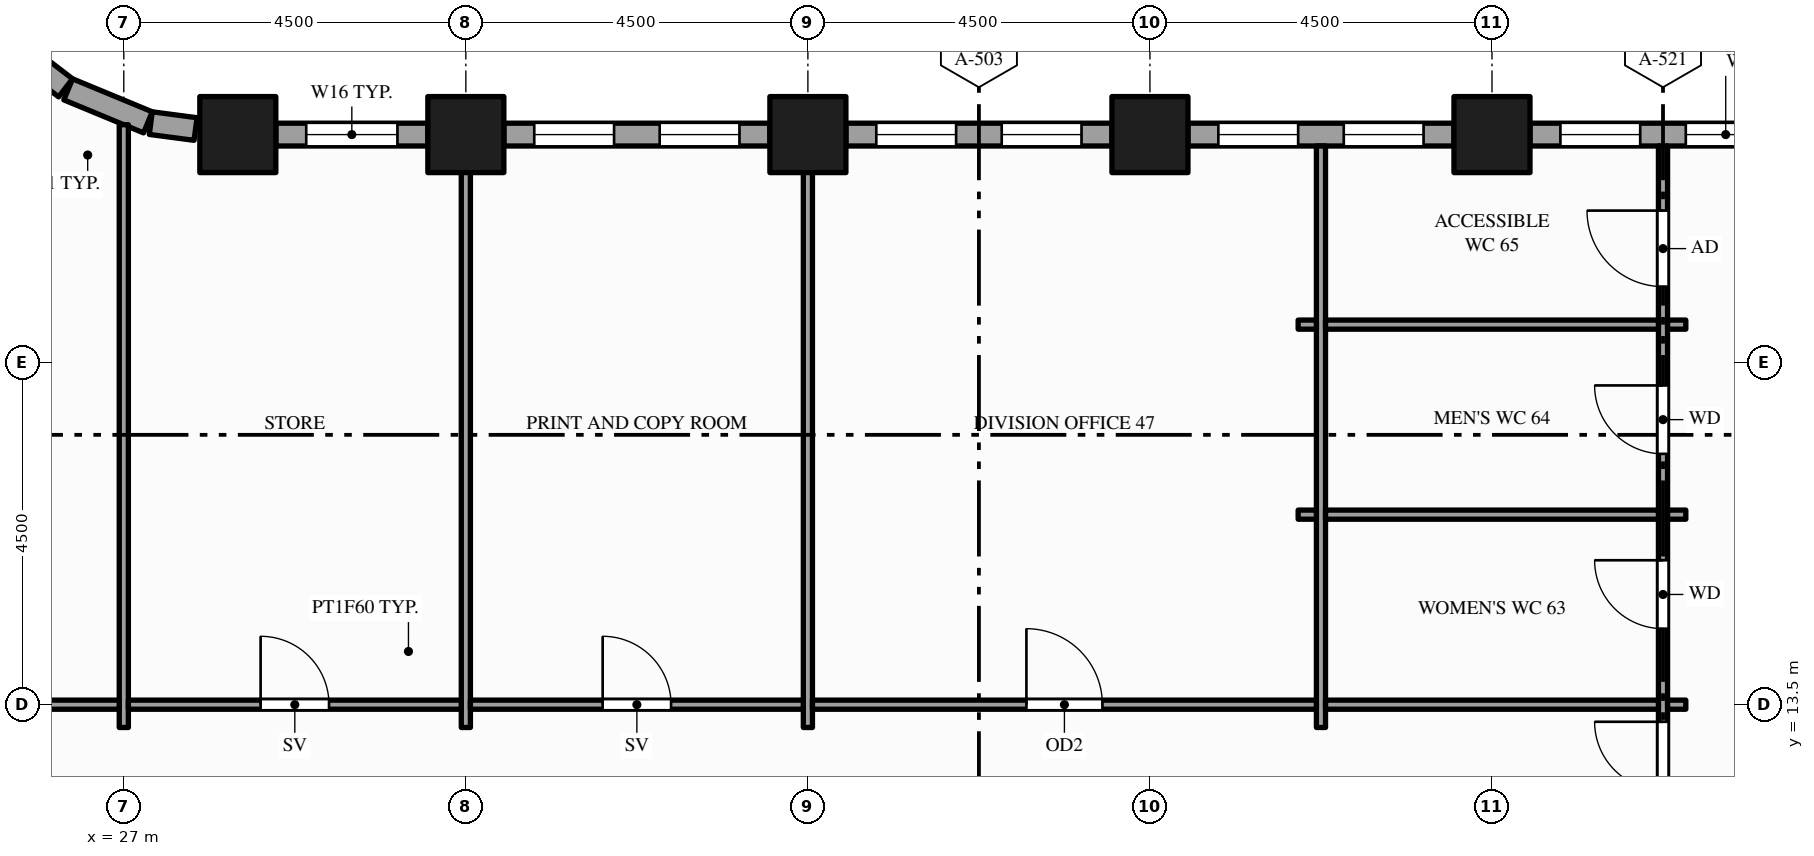
"""IFC4 building model, lengths in metres.
Left out: names, types, materials, properties, quantities, classifications, styles, units other than length and angle.
Written with IfcOpenShell. Run it as: python <this file> out.ifc"""

import sys

from ifc_helpers import new_model, si_unit, direction, frame, frame_2d, origin, origin_2d, place, context, subcontext, project, spatial, rectangle, hollow_rectangle, extrude, element, fill, save


model = new_model("IFC4")
c1 = context("Model", 3, precision=1e-05, world=origin(), true_north=direction((0.0, 1.0)))
c2 = subcontext(c1, "Body", "Model", "MODEL_VIEW")
j1 = project(units=[si_unit("LENGTHUNIT", "METRE"), si_unit("PLANEANGLEUNIT", "RADIAN")], contexts=[c1])
p1 = place(None, origin())
s1 = spatial("IfcSite", under=j1, at=p1, CompositionType="ELEMENT")
p2 = place(p1, origin())
s2 = spatial("IfcBuilding", under=s1, at=p2, CompositionType="ELEMENT")
p3 = place(p2, frame((0.0, 0.0, 127.0)))
s3 = spatial("IfcBuildingStorey", under=s2, at=p3, CompositionType="ELEMENT", Elevation=127.0)
for number, where, z_axis, x_axis in (
    (1, (28.5, 21.0, -0.15), (0.0, 0.0, 1.0), (1.0, 0.0, 0.0)),
    (2, (31.5, 21.0, -0.15), (0.0, 0.0, 1.0), (1.0, 0.0, 0.0)),
    (3, (36.0, 21.0, -0.15), (0.0, 0.0, 1.0), (1.0, 0.0, 0.0)),
    (4, (40.5, 21.0, -0.15), (0.0, 0.0, 1.0), (1.0, 0.0, 0.0)),
    (5, (45.0, 21.0, -0.15), (0.0, 0.0, 1.0), (1.0, 0.0, 0.0)),
):
    element("IfcColumn", number, at=place(p3, frame(where, z_axis=z_axis, x_axis=x_axis)), inside=s3, PredefinedType="COLUMN", context=c2, shape_type="SweptSolid", body=[
        extrude(hollow_rectangle(XDim=1.0, YDim=1.0, WallThickness=0.05, at=origin_2d()), origin(), (0.0, 0.0, 1.0), 3.9),
    ])
p4 = place(p3, frame((49.0, 21.0, 0.0), z_axis=(0.0, 0.0, 1.0), x_axis=(-1.0, 0.0, 0.0)))
e6 = element("IfcWall", 6, at=p4, inside=s3, PredefinedType="STANDARD", context=c2, shape_type="SweptSolid", body=[
    extrude(rectangle(XDim=3.5, YDim=0.3, at=frame_2d((1.75, 0.0))), origin(), (0.0, 0.0, 1.0), 2.838),
])
p5 = place(p4, frame((0.4, 0.0, 0.9)))
e7 = element("IfcOpeningElement", 7, at=p5, cuts=e6, PredefinedType="OPENING", context=c2, shape_type="SweptSolid", body=[
    extrude(rectangle(XDim=1.05, YDim=1.75, at=frame_2d((0.525, 0.875))), frame((0.0, 0.16, 0.0), z_axis=(0.0, -1.0, 0.0), x_axis=(1.0, 0.0, 0.0)), (0.0, 0.0, 1.0), 0.32),
])
p6 = place(p4, frame((2.05, 0.0, 0.9)))
e8 = element("IfcOpeningElement", 8, at=p6, cuts=e6, PredefinedType="OPENING", context=c2, shape_type="SweptSolid", body=[
    extrude(rectangle(XDim=1.05, YDim=1.75, at=frame_2d((0.525, 0.875))), frame((0.0, 0.16, 0.0), z_axis=(0.0, -1.0, 0.0), x_axis=(1.0, 0.0, 0.0)), (0.0, 0.0, 1.0), 0.32),
])
p7 = place(p3, frame((44.5, 21.0, 0.0), z_axis=(0.0, 0.0, 1.0), x_axis=(-1.0, 0.0, 0.0)))
e9 = element("IfcWall", 9, at=p7, inside=s3, PredefinedType="STANDARD", context=c2, shape_type="SweptSolid", body=[
    extrude(rectangle(XDim=3.5, YDim=0.3, at=frame_2d((1.75, 0.0))), origin(), (0.0, 0.0, 1.0), 2.838),
])
p8 = place(p7, frame((0.4, 0.0, 0.9)))
e10 = element("IfcOpeningElement", 10, at=p8, cuts=e9, PredefinedType="OPENING", context=c2, shape_type="SweptSolid", body=[
    extrude(rectangle(XDim=1.05, YDim=1.75, at=frame_2d((0.525, 0.875))), frame((0.0, 0.16, 0.0), z_axis=(0.0, -1.0, 0.0), x_axis=(1.0, 0.0, 0.0)), (0.0, 0.0, 1.0), 0.32),
])
p9 = place(p7, frame((2.05, 0.0, 0.9)))
e11 = element("IfcOpeningElement", 11, at=p9, cuts=e9, PredefinedType="OPENING", context=c2, shape_type="SweptSolid", body=[
    extrude(rectangle(XDim=1.05, YDim=1.75, at=frame_2d((0.525, 0.875))), frame((0.0, 0.16, 0.0), z_axis=(0.0, -1.0, 0.0), x_axis=(1.0, 0.0, 0.0)), (0.0, 0.0, 1.0), 0.32),
])
p10 = place(p3, frame((40.0, 21.0, 0.0), z_axis=(0.0, 0.0, 1.0), x_axis=(-1.0, 0.0, 0.0)))
e12 = element("IfcWall", 12, at=p10, inside=s3, PredefinedType="STANDARD", context=c2, shape_type="SweptSolid", body=[
    extrude(rectangle(XDim=3.5, YDim=0.3, at=frame_2d((1.75, 0.0))), origin(), (0.0, 0.0, 1.0), 2.838),
])
p11 = place(p10, frame((0.4, 0.0, 0.9)))
e13 = element("IfcOpeningElement", 13, at=p11, cuts=e12, PredefinedType="OPENING", context=c2, shape_type="SweptSolid", body=[
    extrude(rectangle(XDim=1.05, YDim=1.75, at=frame_2d((0.525, 0.875))), frame((0.0, 0.16, 0.0), z_axis=(0.0, -1.0, 0.0), x_axis=(1.0, 0.0, 0.0)), (0.0, 0.0, 1.0), 0.32),
])
p12 = place(p10, frame((2.05, 0.0, 0.9)))
e14 = element("IfcOpeningElement", 14, at=p12, cuts=e12, PredefinedType="OPENING", context=c2, shape_type="SweptSolid", body=[
    extrude(rectangle(XDim=1.05, YDim=1.75, at=frame_2d((0.525, 0.875))), frame((0.0, 0.16, 0.0), z_axis=(0.0, -1.0, 0.0), x_axis=(1.0, 0.0, 0.0)), (0.0, 0.0, 1.0), 0.32),
])
p13 = place(p3, frame((35.5, 21.0, 0.0), z_axis=(0.0, 0.0, 1.0), x_axis=(-1.0, 0.0, 0.0)))
e15 = element("IfcWall", 15, at=p13, inside=s3, PredefinedType="STANDARD", context=c2, shape_type="SweptSolid", body=[
    extrude(rectangle(XDim=3.5, YDim=0.3, at=frame_2d((1.75, 0.0))), origin(), (0.0, 0.0, 1.0), 2.838),
])
p14 = place(p13, frame((0.4, 0.0, 0.9)))
e16 = element("IfcOpeningElement", 16, at=p14, cuts=e15, PredefinedType="OPENING", context=c2, shape_type="SweptSolid", body=[
    extrude(rectangle(XDim=1.05, YDim=1.75, at=frame_2d((0.525, 0.875))), frame((0.0, 0.16, 0.0), z_axis=(0.0, -1.0, 0.0), x_axis=(1.0, 0.0, 0.0)), (0.0, 0.0, 1.0), 0.32),
])
p15 = place(p13, frame((2.05, 0.0, 0.9)))
e17 = element("IfcOpeningElement", 17, at=p15, cuts=e15, PredefinedType="OPENING", context=c2, shape_type="SweptSolid", body=[
    extrude(rectangle(XDim=1.05, YDim=1.75, at=frame_2d((0.525, 0.875))), frame((0.0, 0.16, 0.0), z_axis=(0.0, -1.0, 0.0), x_axis=(1.0, 0.0, 0.0)), (0.0, 0.0, 1.0), 0.32),
])
p16 = place(p3, frame((31.0, 21.0, 0.0), z_axis=(0.0, 0.0, 1.0), x_axis=(-1.0, 0.0, 0.0)))
e18 = element("IfcWall", 18, at=p16, inside=s3, PredefinedType="STANDARD", context=c2, shape_type="SweptSolid", body=[
    extrude(rectangle(XDim=2.0, YDim=0.3, at=frame_2d((1.0, 0.0))), origin(), (0.0, 0.0, 1.0), 2.838),
])
p17 = place(p16, frame((0.4, 0.0, 0.9)))
e19 = element("IfcOpeningElement", 19, at=p17, cuts=e18, PredefinedType="OPENING", context=c2, shape_type="SweptSolid", body=[
    extrude(rectangle(XDim=1.2, YDim=1.75, at=frame_2d((0.6, 0.875))), frame((0.0, 0.16, 0.0), z_axis=(0.0, -1.0, 0.0), x_axis=(1.0, 0.0, 0.0)), (0.0, 0.0, 1.0), 0.32),
])
p18 = place(p3, frame((27.944, 21.073, 0.0), z_axis=(0.0, 0.0, 1.0), x_axis=(-0.991420685839, 0.130709692412, 0.0)))
e20 = element("IfcWall", 20, at=p18, inside=s3, PredefinedType="STANDARD", context=c2, shape_type="SweptSolid", body=[
    extrude(rectangle(XDim=0.594, YDim=0.3, at=frame_2d((0.297, 0.0))), origin(), (0.0, 0.0, 1.0), 3.054),
])
p19 = place(p3, frame((27.317, 21.161, 0.0), z_axis=(0.0, 0.0, 1.0), x_axis=(-0.923914616768, 0.382598720491, 0.0)))
e21 = element("IfcWall", 21, at=p19, inside=s3, PredefinedType="STANDARD", context=c2, shape_type="SweptSolid", body=[
    extrude(rectangle(XDim=1.135, YDim=0.3, at=frame_2d((0.568, 0.0))), origin(), (0.0, 0.0, 1.0), 2.838),
])
p20 = place(p3, frame((26.234, 21.615, 0.0), z_axis=(0.0, 0.0, 1.0), x_axis=(-0.793563062559, 0.608488016104, 0.0)))
e22 = element("IfcWall", 22, at=p20, inside=s3, PredefinedType="STANDARD", context=c2, shape_type="SweptSolid", body=[
    extrude(rectangle(XDim=0.454, YDim=0.3, at=frame_2d((0.227, 0.0))), origin(), (0.0, 0.0, 1.0), 3.054),
])
p21 = place(p3, frame((27.0, 13.2, 0.0), z_axis=(0.0, 0.0, 1.0), x_axis=(0.0, 1.0, 0.0)))
e23 = element("IfcWall", 23, at=p21, inside=s3, PredefinedType="PARTITIONING", context=c2, shape_type="SweptSolid", body=[
    extrude(rectangle(XDim=7.93, YDim=0.12, at=frame_2d((3.965, 0.0))), origin(), (0.0, 0.0, 1.0), 2.838),
])
for number, where, z_axis, x_axis in (
    (24, (31.5, 13.2, 0.0), (0.0, 0.0, 1.0), (0.0, 1.0, 0.0)),
    (25, (36.0, 13.2, 0.0), (0.0, 0.0, 1.0), (0.0, 1.0, 0.0)),
    (26, (42.75, 13.2, 0.0), (0.0, 0.0, 1.0), (0.0, 1.0, 0.0)),
):
    element("IfcWall", number, at=place(p3, frame(where, z_axis=z_axis, x_axis=x_axis)), inside=s3, PredefinedType="PARTITIONING", context=c2, shape_type="SweptSolid", body=[
        extrude(rectangle(XDim=7.65, YDim=0.12, at=frame_2d((3.825, 0.0))), origin(), (0.0, 0.0, 1.0), 2.838),
    ])
p22 = place(p3, frame((47.25, -1.35, 0.0), z_axis=(0.0, 0.0, 1.0), x_axis=(0.0, 1.0, 0.0)))
e27 = element("IfcWall", 27, at=p22, inside=s3, PredefinedType="PARTITIONING", context=c2, shape_type="SweptSolid", body=[
    extrude(rectangle(XDim=22.2, YDim=0.12, at=frame_2d((11.1, 0.0))), origin(), (0.0, 0.0, 1.0), 2.838),
])
p23 = place(p22, frame((12.825, 0.0, 0.0)))
e28 = element("IfcOpeningElement", 28, at=p23, cuts=e27, PredefinedType="OPENING", context=c2, shape_type="SweptSolid", body=[
    extrude(rectangle(XDim=1.8, YDim=2.1, at=frame_2d((0.9, 1.05))), frame((0.0, 0.07, 0.0), z_axis=(0.0, -1.0, 0.0), x_axis=(1.0, 0.0, 0.0)), (0.0, 0.0, 1.0), 0.14),
])
p24 = place(p22, frame((15.85, 0.0, 0.0)))
e29 = element("IfcOpeningElement", 29, at=p24, cuts=e27, PredefinedType="OPENING", context=c2, shape_type="SweptSolid", body=[
    extrude(rectangle(XDim=0.9, YDim=2.1, at=frame_2d((0.45, 1.05))), frame((0.0, 0.07, 0.0), z_axis=(0.0, -1.0, 0.0), x_axis=(1.0, 0.0, 0.0)), (0.0, 0.0, 1.0), 0.14),
])
p25 = place(p22, frame((18.15, 0.0, 0.0)))
e30 = element("IfcOpeningElement", 30, at=p25, cuts=e27, PredefinedType="OPENING", context=c2, shape_type="SweptSolid", body=[
    extrude(rectangle(XDim=0.9, YDim=2.1, at=frame_2d((0.45, 1.05))), frame((0.0, 0.07, 0.0), z_axis=(0.0, -1.0, 0.0), x_axis=(1.0, 0.0, 0.0)), (0.0, 0.0, 1.0), 0.14),
])
p26 = place(p22, frame((20.35, 0.0, 0.0)))
e31 = element("IfcOpeningElement", 31, at=p26, cuts=e27, PredefinedType="OPENING", context=c2, shape_type="SweptSolid", body=[
    extrude(rectangle(XDim=1.0, YDim=2.1, at=frame_2d((0.5, 1.05))), frame((0.0, 0.07, 0.0), z_axis=(0.0, -1.0, 0.0), x_axis=(1.0, 0.0, 0.0)), (0.0, 0.0, 1.0), 0.14),
])
p27 = place(p3, frame((11.31, 13.5, 0.0), z_axis=(0.0, 0.0, 1.0), x_axis=(1.0, 0.0, 0.0)))
e32 = element("IfcWall", 32, at=p27, inside=s3, PredefinedType="PARTITIONING", context=c2, shape_type="SweptSolid", body=[
    extrude(rectangle(XDim=15.63, YDim=0.12, at=frame_2d((7.815, 0.0))), origin(), (0.0, 0.0, 1.0), 2.838),
])
p28 = place(p27, frame((3.54, 0.0, 0.0)))
e33 = element("IfcOpeningElement", 33, at=p28, cuts=e32, PredefinedType="OPENING", context=c2, shape_type="SweptSolid", body=[
    extrude(rectangle(XDim=1.8, YDim=2.1, at=frame_2d((0.9, 1.05))), frame((0.0, 0.07, 0.0), z_axis=(0.0, -1.0, 0.0), x_axis=(1.0, 0.0, 0.0)), (0.0, 0.0, 1.0), 0.14),
])
p29 = place(p3, frame((27.06, 13.5, 0.0), z_axis=(0.0, 0.0, 1.0), x_axis=(1.0, 0.0, 0.0)))
e34 = element("IfcWall", 34, at=p29, inside=s3, PredefinedType="PARTITIONING", context=c2, shape_type="SweptSolid", body=[
    extrude(rectangle(XDim=4.38, YDim=0.12, at=frame_2d((2.19, 0.0))), origin(), (0.0, 0.0, 1.0), 2.838),
])
p30 = place(p29, frame((1.74, 0.0, 0.0)))
e35 = element("IfcOpeningElement", 35, at=p30, cuts=e34, PredefinedType="OPENING", context=c2, shape_type="SweptSolid", body=[
    extrude(rectangle(XDim=0.9, YDim=2.1, at=frame_2d((0.45, 1.05))), frame((0.0, 0.07, 0.0), z_axis=(0.0, -1.0, 0.0), x_axis=(1.0, 0.0, 0.0)), (0.0, 0.0, 1.0), 0.14),
])
p31 = place(p3, frame((31.56, 13.5, 0.0), z_axis=(0.0, 0.0, 1.0), x_axis=(1.0, 0.0, 0.0)))
e36 = element("IfcWall", 36, at=p31, inside=s3, PredefinedType="PARTITIONING", context=c2, shape_type="SweptSolid", body=[
    extrude(rectangle(XDim=4.38, YDim=0.12, at=frame_2d((2.19, 0.0))), origin(), (0.0, 0.0, 1.0), 2.838),
])
p32 = place(p31, frame((1.74, 0.0, 0.0)))
e37 = element("IfcOpeningElement", 37, at=p32, cuts=e36, PredefinedType="OPENING", context=c2, shape_type="SweptSolid", body=[
    extrude(rectangle(XDim=0.9, YDim=2.1, at=frame_2d((0.45, 1.05))), frame((0.0, 0.07, 0.0), z_axis=(0.0, -1.0, 0.0), x_axis=(1.0, 0.0, 0.0)), (0.0, 0.0, 1.0), 0.14),
])
p33 = place(p3, frame((36.06, 13.5, 0.0), z_axis=(0.0, 0.0, 1.0), x_axis=(1.0, 0.0, 0.0)))
e38 = element("IfcWall", 38, at=p33, inside=s3, PredefinedType="PARTITIONING", context=c2, shape_type="SweptSolid", body=[
    extrude(rectangle(XDim=6.63, YDim=0.12, at=frame_2d((3.315, 0.0))), origin(), (0.0, 0.0, 1.0), 2.838),
])
p34 = place(p33, frame((2.815, 0.0, 0.0)))
e39 = element("IfcOpeningElement", 39, at=p34, cuts=e38, PredefinedType="OPENING", context=c2, shape_type="SweptSolid", body=[
    extrude(rectangle(XDim=1.0, YDim=2.1, at=frame_2d((0.5, 1.05))), frame((0.0, 0.07, 0.0), z_axis=(0.0, -1.0, 0.0), x_axis=(1.0, 0.0, 0.0)), (0.0, 0.0, 1.0), 0.14),
])
p35 = place(p3, frame((42.81, 13.5, 0.0), z_axis=(0.0, 0.0, 1.0), x_axis=(1.0, 0.0, 0.0)))
e40 = element("IfcWall", 40, at=p35, inside=s3, PredefinedType="PARTITIONING", context=c2, shape_type="SweptSolid", body=[
    extrude(rectangle(XDim=4.38, YDim=0.12, at=frame_2d((2.19, 0.0))), origin(), (0.0, 0.0, 1.0), 2.838),
])
for number, where, z_axis, x_axis in (
    (41, (47.31, 13.5, 0.0), (0.0, 0.0, 1.0), (1.0, 0.0, 0.0)),
    (42, (42.45, 16.0, 0.0), (0.0, 0.0, 1.0), (1.0, 0.0, 0.0)),
):
    element("IfcWall", number, at=place(p3, frame(where, z_axis=z_axis, x_axis=x_axis)), inside=s3, PredefinedType="PARTITIONING", context=c2, shape_type="SweptSolid", body=[
        extrude(rectangle(XDim=0.24, YDim=0.12, at=frame_2d((0.12, 0.0))), origin(), (0.0, 0.0, 1.0), 2.838),
    ])
p36 = place(p3, frame((42.81, 16.0, 0.0), z_axis=(0.0, 0.0, 1.0), x_axis=(1.0, 0.0, 0.0)))
e43 = element("IfcWall", 43, at=p36, inside=s3, PredefinedType="PARTITIONING", context=c2, shape_type="SweptSolid", body=[
    extrude(rectangle(XDim=4.38, YDim=0.12, at=frame_2d((2.19, 0.0))), origin(), (0.0, 0.0, 1.0), 2.838),
])
for number, where, z_axis, x_axis in (
    (44, (47.31, 16.0, 0.0), (0.0, 0.0, 1.0), (1.0, 0.0, 0.0)),
    (45, (42.45, 18.5, 0.0), (0.0, 0.0, 1.0), (1.0, 0.0, 0.0)),
):
    element("IfcWall", number, at=place(p3, frame(where, z_axis=z_axis, x_axis=x_axis)), inside=s3, PredefinedType="PARTITIONING", context=c2, shape_type="SweptSolid", body=[
        extrude(rectangle(XDim=0.24, YDim=0.12, at=frame_2d((0.12, 0.0))), origin(), (0.0, 0.0, 1.0), 2.838),
    ])
p37 = place(p3, frame((42.81, 18.5, 0.0), z_axis=(0.0, 0.0, 1.0), x_axis=(1.0, 0.0, 0.0)))
e46 = element("IfcWall", 46, at=p37, inside=s3, PredefinedType="PARTITIONING", context=c2, shape_type="SweptSolid", body=[
    extrude(rectangle(XDim=4.38, YDim=0.12, at=frame_2d((2.19, 0.0))), origin(), (0.0, 0.0, 1.0), 2.838),
])
p38 = place(p3, frame((47.31, 18.5, 0.0), z_axis=(0.0, 0.0, 1.0), x_axis=(1.0, 0.0, 0.0)))
e47 = element("IfcWall", 47, at=p38, inside=s3, PredefinedType="PARTITIONING", context=c2, shape_type="SweptSolid", body=[
    extrude(rectangle(XDim=0.24, YDim=0.12, at=frame_2d((0.12, 0.0))), origin(), (0.0, 0.0, 1.0), 2.838),
])
p39 = place(p5, origin())
e48 = element("IfcWindow", 48, at=p39, inside=s3, PartitioningType="SINGLE_PANEL", PredefinedType="WINDOW", context=c2, shape_type="SweptSolid", body=[
    extrude(rectangle(XDim=1.05, YDim=1.75, at=frame_2d((0.525, 0.875))), frame((0.0, 0.03, 0.0), z_axis=(0.0, -1.0, 0.0), x_axis=(1.0, 0.0, 0.0)), (0.0, 0.0, 1.0), 0.06),
])
fill(e7, e48)
p40 = place(p6, origin())
e49 = element("IfcWindow", 49, at=p40, inside=s3, PartitioningType="SINGLE_PANEL", PredefinedType="WINDOW", context=c2, shape_type="SweptSolid", body=[
    extrude(rectangle(XDim=1.05, YDim=1.75, at=frame_2d((0.525, 0.875))), frame((0.0, 0.03, 0.0), z_axis=(0.0, -1.0, 0.0), x_axis=(1.0, 0.0, 0.0)), (0.0, 0.0, 1.0), 0.06),
])
fill(e8, e49)
p41 = place(p8, origin())
e50 = element("IfcWindow", 50, at=p41, inside=s3, PartitioningType="SINGLE_PANEL", PredefinedType="WINDOW", context=c2, shape_type="SweptSolid", body=[
    extrude(rectangle(XDim=1.05, YDim=1.75, at=frame_2d((0.525, 0.875))), frame((0.0, 0.03, 0.0), z_axis=(0.0, -1.0, 0.0), x_axis=(1.0, 0.0, 0.0)), (0.0, 0.0, 1.0), 0.06),
])
fill(e10, e50)
p42 = place(p9, origin())
e51 = element("IfcWindow", 51, at=p42, inside=s3, PartitioningType="SINGLE_PANEL", PredefinedType="WINDOW", context=c2, shape_type="SweptSolid", body=[
    extrude(rectangle(XDim=1.05, YDim=1.75, at=frame_2d((0.525, 0.875))), frame((0.0, 0.03, 0.0), z_axis=(0.0, -1.0, 0.0), x_axis=(1.0, 0.0, 0.0)), (0.0, 0.0, 1.0), 0.06),
])
fill(e11, e51)
p43 = place(p11, origin())
e52 = element("IfcWindow", 52, at=p43, inside=s3, PartitioningType="SINGLE_PANEL", PredefinedType="WINDOW", context=c2, shape_type="SweptSolid", body=[
    extrude(rectangle(XDim=1.05, YDim=1.75, at=frame_2d((0.525, 0.875))), frame((0.0, 0.03, 0.0), z_axis=(0.0, -1.0, 0.0), x_axis=(1.0, 0.0, 0.0)), (0.0, 0.0, 1.0), 0.06),
])
fill(e13, e52)
p44 = place(p12, origin())
e53 = element("IfcWindow", 53, at=p44, inside=s3, PartitioningType="SINGLE_PANEL", PredefinedType="WINDOW", context=c2, shape_type="SweptSolid", body=[
    extrude(rectangle(XDim=1.05, YDim=1.75, at=frame_2d((0.525, 0.875))), frame((0.0, 0.03, 0.0), z_axis=(0.0, -1.0, 0.0), x_axis=(1.0, 0.0, 0.0)), (0.0, 0.0, 1.0), 0.06),
])
fill(e14, e53)
p45 = place(p14, origin())
e54 = element("IfcWindow", 54, at=p45, inside=s3, PartitioningType="SINGLE_PANEL", PredefinedType="WINDOW", context=c2, shape_type="SweptSolid", body=[
    extrude(rectangle(XDim=1.05, YDim=1.75, at=frame_2d((0.525, 0.875))), frame((0.0, 0.03, 0.0), z_axis=(0.0, -1.0, 0.0), x_axis=(1.0, 0.0, 0.0)), (0.0, 0.0, 1.0), 0.06),
])
fill(e16, e54)
p46 = place(p15, origin())
e55 = element("IfcWindow", 55, at=p46, inside=s3, PartitioningType="SINGLE_PANEL", PredefinedType="WINDOW", context=c2, shape_type="SweptSolid", body=[
    extrude(rectangle(XDim=1.05, YDim=1.75, at=frame_2d((0.525, 0.875))), frame((0.0, 0.03, 0.0), z_axis=(0.0, -1.0, 0.0), x_axis=(1.0, 0.0, 0.0)), (0.0, 0.0, 1.0), 0.06),
])
fill(e17, e55)
p47 = place(p17, origin())
e56 = element("IfcWindow", 56, at=p47, inside=s3, PartitioningType="SINGLE_PANEL", PredefinedType="WINDOW", context=c2, shape_type="SweptSolid", body=[
    extrude(rectangle(XDim=1.2, YDim=1.75, at=frame_2d((0.6, 0.875))), frame((0.0, 0.03, 0.0), z_axis=(0.0, -1.0, 0.0), x_axis=(1.0, 0.0, 0.0)), (0.0, 0.0, 1.0), 0.06),
])
fill(e19, e56)
p48 = place(p23, origin())
e57 = element("IfcDoor", 57, at=p48, inside=s3, OperationType="DOUBLE_DOOR_SINGLE_SWING", PredefinedType="DOOR", context=c2, shape_type="SweptSolid", body=[
    extrude(rectangle(XDim=1.8, YDim=2.1, at=frame_2d((0.9, 1.05))), frame((0.0, 0.025, 0.0), z_axis=(0.0, -1.0, 0.0), x_axis=(1.0, 0.0, 0.0)), (0.0, 0.0, 1.0), 0.05),
])
fill(e28, e57)
p49 = place(p30, origin())
e58 = element("IfcDoor", 58, at=p49, inside=s3, OperationType="SINGLE_SWING_LEFT", PredefinedType="DOOR", context=c2, shape_type="SweptSolid", body=[
    extrude(rectangle(XDim=0.9, YDim=2.1, at=frame_2d((0.45, 1.05))), frame((0.0, 0.025, 0.0), z_axis=(0.0, -1.0, 0.0), x_axis=(1.0, 0.0, 0.0)), (0.0, 0.0, 1.0), 0.05),
])
fill(e35, e58)
p50 = place(p32, origin())
e59 = element("IfcDoor", 59, at=p50, inside=s3, OperationType="SINGLE_SWING_LEFT", PredefinedType="DOOR", context=c2, shape_type="SweptSolid", body=[
    extrude(rectangle(XDim=0.9, YDim=2.1, at=frame_2d((0.45, 1.05))), frame((0.0, 0.025, 0.0), z_axis=(0.0, -1.0, 0.0), x_axis=(1.0, 0.0, 0.0)), (0.0, 0.0, 1.0), 0.05),
])
fill(e37, e59)
p51 = place(p34, origin())
e60 = element("IfcDoor", 60, at=p51, inside=s3, OperationType="SINGLE_SWING_LEFT", PredefinedType="DOOR", context=c2, shape_type="SweptSolid", body=[
    extrude(rectangle(XDim=1.0, YDim=2.1, at=frame_2d((0.5, 1.05))), frame((0.0, 0.025, 0.0), z_axis=(0.0, -1.0, 0.0), x_axis=(1.0, 0.0, 0.0)), (0.0, 0.0, 1.0), 0.05),
])
fill(e39, e60)
p52 = place(p24, origin())
e61 = element("IfcDoor", 61, at=p52, inside=s3, OperationType="SINGLE_SWING_RIGHT", PredefinedType="DOOR", context=c2, shape_type="SweptSolid", body=[
    extrude(rectangle(XDim=0.9, YDim=2.1, at=frame_2d((0.45, 1.05))), frame((0.0, 0.025, 0.0), z_axis=(0.0, -1.0, 0.0), x_axis=(1.0, 0.0, 0.0)), (0.0, 0.0, 1.0), 0.05),
])
fill(e29, e61)
p53 = place(p25, origin())
e62 = element("IfcDoor", 62, at=p53, inside=s3, OperationType="SINGLE_SWING_RIGHT", PredefinedType="DOOR", context=c2, shape_type="SweptSolid", body=[
    extrude(rectangle(XDim=0.9, YDim=2.1, at=frame_2d((0.45, 1.05))), frame((0.0, 0.025, 0.0), z_axis=(0.0, -1.0, 0.0), x_axis=(1.0, 0.0, 0.0)), (0.0, 0.0, 1.0), 0.05),
])
fill(e30, e62)
p54 = place(p26, origin())
e63 = element("IfcDoor", 63, at=p54, inside=s3, OperationType="SINGLE_SWING_RIGHT", PredefinedType="DOOR", context=c2, shape_type="SweptSolid", body=[
    extrude(rectangle(XDim=1.0, YDim=2.1, at=frame_2d((0.5, 1.05))), frame((0.0, 0.025, 0.0), z_axis=(0.0, -1.0, 0.0), x_axis=(1.0, 0.0, 0.0)), (0.0, 0.0, 1.0), 0.05),
])
fill(e31, e63)
save(model, sys.argv[1])
